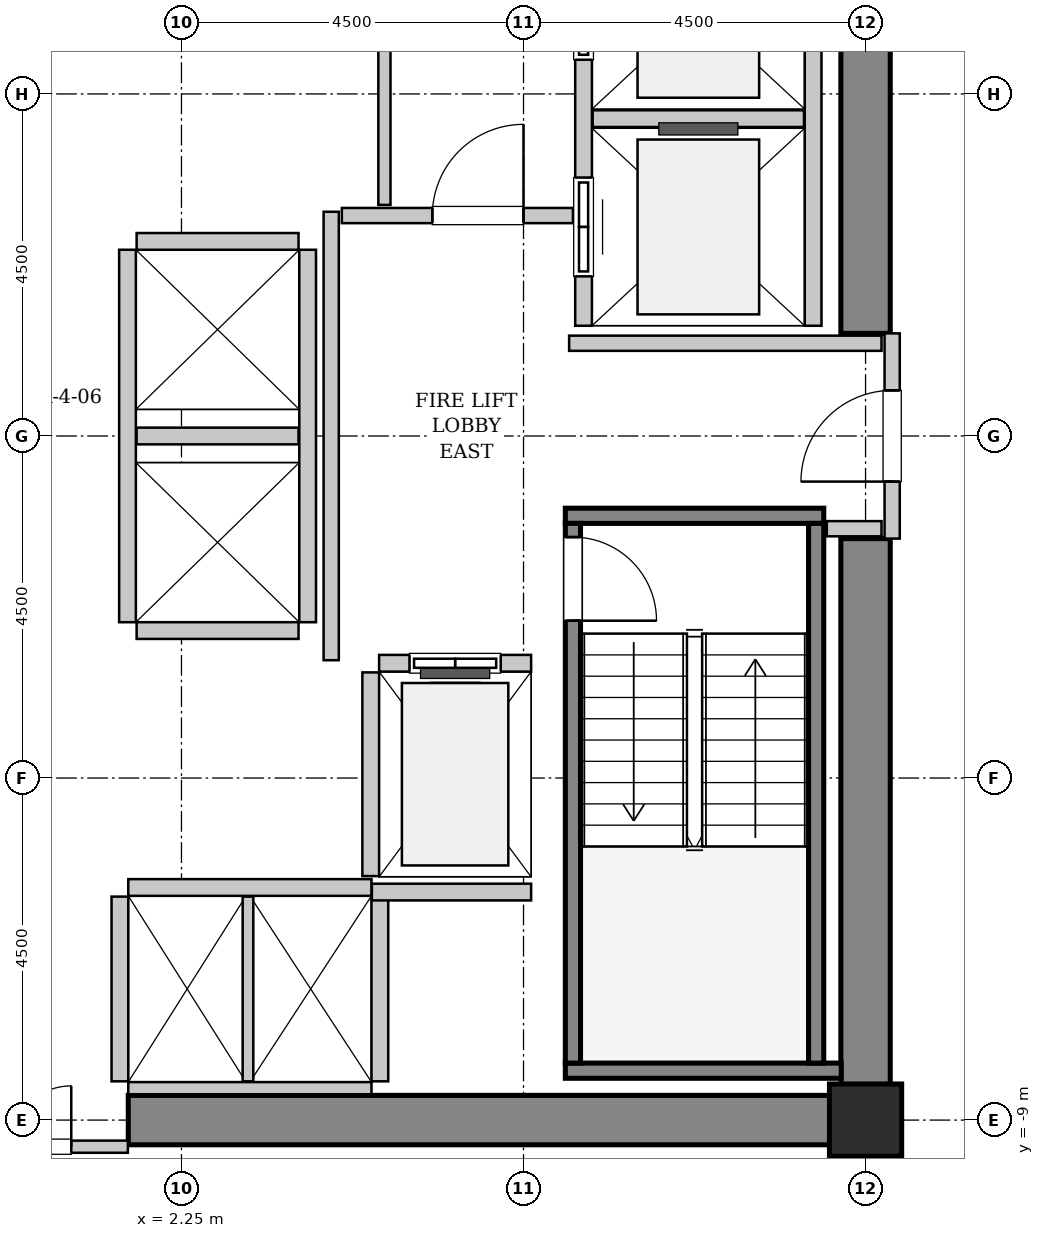
"""IFC4 building model, lengths in metres.
Left out: names, types, materials, properties, quantities, classifications, styles, units other than length and angle.
Written with IfcOpenShell. Run it as: python <this file> out.ifc"""

import sys

from ifc_helpers import new_model, si_unit, direction, frame, frame_2d, origin, origin_2d, place, context, subcontext, project, spatial, rectangle, hollow_rectangle, extrude, source, transform, mapped, element, fill, save


model = new_model("IFC4")
c1 = context("Model", 3, precision=1e-05, world=origin(), true_north=direction((0.0, 1.0)))
c2 = subcontext(c1, "Body", "Model", "MODEL_VIEW")
j1 = project(units=[si_unit("LENGTHUNIT", "METRE"), si_unit("PLANEANGLEUNIT", "RADIAN")], contexts=[c1])
p1 = place(None, origin())
s1 = spatial("IfcSite", under=j1, at=p1, CompositionType="ELEMENT")
p2 = place(p1, origin())
s2 = spatial("IfcBuilding", under=s1, at=p2, CompositionType="ELEMENT")
p3 = place(p2, frame((0.0, 0.0, 36.8)))
s3 = spatial("IfcBuildingStorey", under=s2, at=p3, CompositionType="ELEMENT", Elevation=36.8)
m1 = source(origin(), c2, "Body", "SweptSolid", [
    extrude(rectangle(XDim=10.025, YDim=0.65, at=frame_2d((5.012, 0.0))), origin(), (0.0, 0.0, 1.0), 3.8),
])
p4 = place(p3, frame((1.55, -9.0, 0.0), z_axis=(0.0, 0.0, 1.0), x_axis=(1.0, 0.0, 0.0)))
e1 = element("IfcWall", 1, at=p4, inside=s3, PredefinedType="SHEAR", context=c2, shape_type="MappedRepresentation", body=[
    mapped(m1, transform((0.0, 0.0, 0.0), x_axis=(1.0, 0.0, 0.0), y_axis=(0.0, 1.0, 0.0), z_axis=(0.0, 0.0, 1.0), scale=1.0)),
])
m2 = source(origin(), c2, "Body", "SweptSolid", [
    extrude(rectangle(XDim=7.325, YDim=0.65, at=frame_2d((3.663, 0.0))), origin(), (0.0, 0.0, 1.0), 3.8),
])
for number, where, z_axis, x_axis in (
    (2, (11.25, -8.675, 0.0), (0.0, 0.0, 1.0), (0.0, 1.0, 0.0)),
    (3, (11.25, 1.35, 0.0), (0.0, 0.0, 1.0), (0.0, 1.0, 0.0)),
):
    element("IfcWall", number, at=place(p3, frame(where, z_axis=z_axis, x_axis=x_axis)), inside=s3, PredefinedType="SHEAR", context=c2, shape_type="MappedRepresentation", body=[
        mapped(m2, transform((0.0, 0.0, 0.0), x_axis=(1.0, 0.0, 0.0), y_axis=(0.0, 1.0, 0.0), z_axis=(0.0, 0.0, 1.0), scale=1.0)),
    ])
m3 = source(origin(), c2, "Body", "SweptSolid", [
    extrude(hollow_rectangle(XDim=0.95, YDim=0.95, WallThickness=0.045, InnerFilletRadius=0.045, OuterFilletRadius=0.09, at=origin_2d()), origin(), (0.0, 0.0, 1.0), 3.8),
])
p5 = place(p3, frame((11.25, -9.0, 0.0), z_axis=(0.0, 0.0, 1.0), x_axis=(1.0, 0.0, 0.0)))
e4 = element("IfcColumn", 4, at=p5, inside=s3, PredefinedType="COLUMN", context=c2, shape_type="MappedRepresentation", body=[
    mapped(m3, transform((0.0, 0.0, 0.0), x_axis=(1.0, 0.0, 0.0), y_axis=(0.0, 1.0, 0.0), z_axis=(0.0, 0.0, 1.0), scale=1.0)),
])
m4 = source(origin(), c2, "Body", "SweptSolid", [
    extrude(rectangle(XDim=3.4, YDim=0.2, at=frame_2d((1.7, 0.0))), origin(), (0.0, 0.0, 1.0), 3.8),
])
p6 = place(p3, frame((7.3, -1.05, 0.0), z_axis=(0.0, 0.0, 1.0), x_axis=(1.0, 0.0, 0.0)))
e5 = element("IfcWall", 5, at=p6, inside=s3, PredefinedType="SOLIDWALL", context=c2, shape_type="MappedRepresentation", body=[
    mapped(m4, transform((0.0, 0.0, 0.0), x_axis=(1.0, 0.0, 0.0), y_axis=(0.0, 1.0, 0.0), z_axis=(0.0, 0.0, 1.0), scale=1.0)),
])
m5 = source(origin(), c2, "Body", "SweptSolid", [
    extrude(rectangle(XDim=3.63, YDim=0.2, at=frame_2d((1.815, 0.0))), origin(), (0.0, 0.0, 1.0), 3.8),
])
p7 = place(p3, frame((7.3, -8.35, 0.0), z_axis=(0.0, 0.0, 1.0), x_axis=(1.0, 0.0, 0.0)))
e6 = element("IfcWall", 6, at=p7, inside=s3, PredefinedType="SOLIDWALL", context=c2, shape_type="MappedRepresentation", body=[
    mapped(m5, transform((0.0, 0.0, 0.0), x_axis=(1.0, 0.0, 0.0), y_axis=(0.0, 1.0, 0.0), z_axis=(0.0, 0.0, 1.0), scale=1.0)),
])
m6 = source(origin(), c2, "Body", "SweptSolid", [
    extrude(rectangle(XDim=7.1, YDim=0.2, at=frame_2d((3.55, 0.0))), origin(), (0.0, 0.0, 1.0), 3.8),
])
p8 = place(p3, frame((7.4, -1.15, 0.0), z_axis=(0.0, 0.0, 1.0), x_axis=(0.0, -1.0, 0.0)))
e7 = element("IfcWall", 7, at=p8, inside=s3, PredefinedType="SOLIDWALL", context=c2, shape_type="MappedRepresentation", body=[
    mapped(m6, transform((0.0, 0.0, 0.0), x_axis=(1.0, 0.0, 0.0), y_axis=(0.0, 1.0, 0.0), z_axis=(0.0, 0.0, 1.0), scale=1.0)),
])
p9 = place(p8, frame((0.18, 0.0, 0.0)))
e8 = element("IfcOpeningElement", 8, at=p9, cuts=e7, PredefinedType="OPENING", context=c2, shape_type="SweptSolid", body=[
    extrude(rectangle(XDim=1.1, YDim=2.15, at=frame_2d((0.55, 1.075))), frame((0.0, 0.11, 0.0), z_axis=(0.0, -1.0, 0.0), x_axis=(1.0, 0.0, 0.0)), (0.0, 0.0, 1.0), 0.22),
])
p10 = place(p3, frame((10.6, -1.15, 0.0), z_axis=(0.0, 0.0, 1.0), x_axis=(0.0, -1.0, 0.0)))
e9 = element("IfcWall", 9, at=p10, inside=s3, PredefinedType="SOLIDWALL", context=c2, shape_type="MappedRepresentation", body=[
    mapped(m6, transform((0.0, 0.0, 0.0), x_axis=(1.0, 0.0, 0.0), y_axis=(0.0, 1.0, 0.0), z_axis=(0.0, 0.0, 1.0), scale=1.0)),
])
m7 = source(origin(), c2, "Body", "SweptSolid", [
    extrude(rectangle(XDim=2.0, YDim=0.22, at=frame_2d((1.0, 0.0))), origin(), (0.0, 0.0, 1.0), 3.535),
])
p11 = place(p3, frame((6.85, -2.99, 0.0), z_axis=(0.0, 0.0, 1.0), x_axis=(-1.0, 0.0, 0.0)))
e10 = element("IfcWall", 10, at=p11, inside=s3, PredefinedType="SOLIDWALL", context=c2, shape_type="MappedRepresentation", body=[
    mapped(m7, transform((0.0, 0.0, 0.0), x_axis=(1.0, 0.0, 0.0), y_axis=(0.0, 1.0, 0.0), z_axis=(0.0, 0.0, 1.0), scale=1.0)),
])
p12 = place(p11, frame((0.4, 0.0, 0.0)))
e11 = element("IfcOpeningElement", 11, at=p12, cuts=e10, PredefinedType="OPENING", context=c2, shape_type="SweptSolid", body=[
    extrude(rectangle(XDim=1.2, YDim=2.2, at=frame_2d((0.6, 1.1))), frame((0.0, 0.12, 0.0), z_axis=(0.0, -1.0, 0.0), x_axis=(1.0, 0.0, 0.0)), (0.0, 0.0, 1.0), 0.24),
])
m8 = source(origin(), c2, "Body", "SweptSolid", [
    extrude(rectangle(XDim=2.68, YDim=0.22, at=frame_2d((1.34, 0.0))), origin(), (0.0, 0.0, 1.0), 3.535),
])
p13 = place(p3, frame((4.74, -3.11, 0.0), z_axis=(0.0, 0.0, 1.0), x_axis=(0.0, -1.0, 0.0)))
e12 = element("IfcWall", 12, at=p13, inside=s3, PredefinedType="SOLIDWALL", context=c2, shape_type="MappedRepresentation", body=[
    mapped(m8, transform((0.0, 0.0, 0.0), x_axis=(1.0, 0.0, 0.0), y_axis=(0.0, 1.0, 0.0), z_axis=(0.0, 0.0, 1.0), scale=1.0)),
])
m9 = source(origin(), c2, "Body", "SweptSolid", [
    extrude(rectangle(XDim=5.45, YDim=0.22, at=frame_2d((2.725, 0.0))), origin(), (0.0, 0.0, 1.0), 3.535),
])
p14 = place(p3, frame((7.54, 6.9, 0.0), z_axis=(0.0, 0.0, 1.0), x_axis=(0.0, -1.0, 0.0)))
e13 = element("IfcWall", 13, at=p14, inside=s3, PredefinedType="SOLIDWALL", context=c2, shape_type="MappedRepresentation", body=[
    mapped(m9, transform((0.0, 0.0, 0.0), x_axis=(1.0, 0.0, 0.0), y_axis=(0.0, 1.0, 0.0), z_axis=(0.0, 0.0, 1.0), scale=1.0)),
])
p15 = place(p14, frame((3.5, 0.0, 0.0)))
e14 = element("IfcOpeningElement", 14, at=p15, cuts=e13, PredefinedType="OPENING", context=c2, shape_type="SweptSolid", body=[
    extrude(rectangle(XDim=1.3, YDim=2.3, at=frame_2d((0.65, 1.15))), frame((0.0, 0.12, 0.0), z_axis=(0.0, -1.0, 0.0), x_axis=(1.0, 0.0, 0.0)), (0.0, 0.0, 1.0), 0.24),
])
p16 = place(p14, frame((0.65, 0.0, 0.0)))
e15 = element("IfcOpeningElement", 15, at=p16, cuts=e13, PredefinedType="OPENING", context=c2, shape_type="SweptSolid", body=[
    extrude(rectangle(XDim=1.3, YDim=2.3, at=frame_2d((0.65, 1.15))), frame((0.0, 0.12, 0.0), z_axis=(0.0, -1.0, 0.0), x_axis=(1.0, 0.0, 0.0)), (0.0, 0.0, 1.0), 0.24),
])
p17 = place(p3, frame((10.56, 1.45, 0.0), z_axis=(0.0, 0.0, 1.0), x_axis=(0.0, 1.0, 0.0)))
e16 = element("IfcWall", 16, at=p17, inside=s3, PredefinedType="SOLIDWALL", context=c2, shape_type="MappedRepresentation", body=[
    mapped(m9, transform((0.0, 0.0, 0.0), x_axis=(1.0, 0.0, 0.0), y_axis=(0.0, 1.0, 0.0), z_axis=(0.0, 0.0, 1.0), scale=1.0)),
])
m10 = source(origin(), c2, "Body", "SweptSolid", [
    extrude(rectangle(XDim=2.78, YDim=0.22, at=frame_2d((1.39, 0.0))), origin(), (0.0, 0.0, 1.0), 3.535),
])
p18 = place(p3, frame((7.66, 4.175, 0.0), z_axis=(0.0, 0.0, 1.0), x_axis=(1.0, 0.0, 0.0)))
e17 = element("IfcWall", 17, at=p18, inside=s3, PredefinedType="SOLIDWALL", context=c2, shape_type="MappedRepresentation", body=[
    mapped(m10, transform((0.0, 0.0, 0.0), x_axis=(1.0, 0.0, 0.0), y_axis=(0.0, 1.0, 0.0), z_axis=(0.0, 0.0, 1.0), scale=1.0)),
])
m11 = source(origin(), c2, "Body", "SweptSolid", [
    extrude(rectangle(XDim=3.2, YDim=0.22, at=frame_2d((1.6, 0.0))), origin(), (0.0, 0.0, 1.0), 3.535),
])
p19 = place(p3, frame((4.75, -5.94, 0.0), z_axis=(0.0, 0.0, 1.0), x_axis=(-1.0, 0.0, 0.0)))
e18 = element("IfcWall", 18, at=p19, inside=s3, PredefinedType="SOLIDWALL", context=c2, shape_type="MappedRepresentation", body=[
    mapped(m11, transform((0.0, 0.0, 0.0), x_axis=(1.0, 0.0, 0.0), y_axis=(0.0, 1.0, 0.0), z_axis=(0.0, 0.0, 1.0), scale=1.0)),
])
m12 = source(origin(), c2, "Body", "SweptSolid", [
    extrude(rectangle(XDim=3.2, YDim=0.16, at=frame_2d((1.6, 0.0))), origin(), (0.0, 0.0, 1.0), 2.425),
])
p20 = place(p3, frame((1.55, -8.58, 0.0), z_axis=(0.0, 0.0, 1.0), x_axis=(1.0, 0.0, 0.0)))
e19 = element("IfcWall", 19, at=p20, inside=s3, PredefinedType="PARTITIONING", context=c2, shape_type="MappedRepresentation", body=[
    mapped(m12, transform((0.0, 0.0, 0.0), x_axis=(1.0, 0.0, 0.0), y_axis=(0.0, 1.0, 0.0), z_axis=(0.0, 0.0, 1.0), scale=1.0)),
])
m13 = source(origin(), c2, "Body", "SweptSolid", [
    extrude(rectangle(XDim=2.43, YDim=0.22, at=frame_2d((1.215, 0.0))), origin(), (0.0, 0.0, 1.0), 3.535),
])
p21 = place(p3, frame((1.44, -6.06, 0.0), z_axis=(0.0, 0.0, 1.0), x_axis=(0.0, -1.0, 0.0)))
e20 = element("IfcWall", 20, at=p21, inside=s3, PredefinedType="SOLIDWALL", context=c2, shape_type="MappedRepresentation", body=[
    mapped(m13, transform((0.0, 0.0, 0.0), x_axis=(1.0, 0.0, 0.0), y_axis=(0.0, 1.0, 0.0), z_axis=(0.0, 0.0, 1.0), scale=1.0)),
])
m14 = source(origin(), c2, "Body", "SweptSolid", [
    extrude(rectangle(XDim=2.43, YDim=0.14, at=frame_2d((1.215, 0.0))), origin(), (0.0, 0.0, 1.0), 3.535),
])
p22 = place(p3, frame((3.125, -8.49, 0.0), z_axis=(0.0, 0.0, 1.0), x_axis=(0.0, 1.0, 0.0)))
e21 = element("IfcWall", 21, at=p22, inside=s3, PredefinedType="PARTITIONING", context=c2, shape_type="MappedRepresentation", body=[
    mapped(m14, transform((0.0, 0.0, 0.0), x_axis=(1.0, 0.0, 0.0), y_axis=(0.0, 1.0, 0.0), z_axis=(0.0, 0.0, 1.0), scale=1.0)),
])
p23 = place(p3, frame((4.86, -8.49, 0.0), z_axis=(0.0, 0.0, 1.0), x_axis=(0.0, 1.0, 0.0)))
e22 = element("IfcWall", 22, at=p23, inside=s3, PredefinedType="SOLIDWALL", context=c2, shape_type="MappedRepresentation", body=[
    mapped(m13, transform((0.0, 0.0, 0.0), x_axis=(1.0, 0.0, 0.0), y_axis=(0.0, 1.0, 0.0), z_axis=(0.0, 0.0, 1.0), scale=1.0)),
])
m15 = source(origin(), c2, "Body", "SweptSolid", [
    extrude(rectangle(XDim=4.9, YDim=0.22, at=frame_2d((2.45, 0.0))), origin(), (0.0, 0.0, 1.0), 3.535),
])
for number, where, z_axis, x_axis in (
    (23, (1.54, 2.45, 0.0), (0.0, 0.0, 1.0), (0.0, -1.0, 0.0)),
    (24, (3.91, -2.45, 0.0), (0.0, 0.0, 1.0), (0.0, 1.0, 0.0)),
):
    element("IfcWall", number, at=place(p3, frame(where, z_axis=z_axis, x_axis=x_axis)), inside=s3, PredefinedType="SOLIDWALL", context=c2, shape_type="MappedRepresentation", body=[
        mapped(m15, transform((0.0, 0.0, 0.0), x_axis=(1.0, 0.0, 0.0), y_axis=(0.0, 1.0, 0.0), z_axis=(0.0, 0.0, 1.0), scale=1.0)),
    ])
m16 = source(origin(), c2, "Body", "SweptSolid", [
    extrude(rectangle(XDim=2.13, YDim=0.22, at=frame_2d((1.065, 0.0))), origin(), (0.0, 0.0, 1.0), 3.535),
])
for number, where, z_axis, x_axis in (
    (25, (1.66, -2.56, 0.0), (0.0, 0.0, 1.0), (1.0, 0.0, 0.0)),
    (26, (1.66, 0.0, 0.0), (0.0, 0.0, 1.0), (1.0, 0.0, 0.0)),
    (27, (3.79, 2.56, 0.0), (0.0, 0.0, 1.0), (-1.0, 0.0, 0.0)),
):
    element("IfcWall", number, at=place(p3, frame(where, z_axis=z_axis, x_axis=x_axis)), inside=s3, PredefinedType="SOLIDWALL", context=c2, shape_type="MappedRepresentation", body=[
        mapped(m16, transform((0.0, 0.0, 0.0), x_axis=(1.0, 0.0, 0.0), y_axis=(0.0, 1.0, 0.0), z_axis=(0.0, 0.0, 1.0), scale=1.0)),
    ])
m17 = source(origin(), c2, "Body", "SweptSolid", [
    extrude(rectangle(XDim=2.095, YDim=0.22, at=frame_2d((1.048, 0.0))), origin(), (0.0, 0.0, 1.0), 3.535),
])
p24 = place(p3, frame((4.755, -6.0, 0.0), z_axis=(0.0, 0.0, 1.0), x_axis=(1.0, 0.0, 0.0)))
e28 = element("IfcWall", 28, at=p24, inside=s3, PredefinedType="SOLIDWALL", context=c2, shape_type="MappedRepresentation", body=[
    mapped(m17, transform((0.0, 0.0, 0.0), x_axis=(1.0, 0.0, 0.0), y_axis=(0.0, 1.0, 0.0), z_axis=(0.0, 0.0, 1.0), scale=1.0)),
])
m18 = source(origin(), c2, "Body", "SweptSolid", [
    extrude(rectangle(XDim=2.7, YDim=0.2, at=frame_2d((1.35, 0.0))), origin(), (0.0, 0.0, 1.0), 2.425),
])
p25 = place(p3, frame((11.6, -1.35, 0.0), z_axis=(0.0, 0.0, 1.0), x_axis=(0.0, 1.0, 0.0)))
e29 = element("IfcWall", 29, at=p25, inside=s3, PredefinedType="PARTITIONING", context=c2, shape_type="MappedRepresentation", body=[
    mapped(m18, transform((0.0, 0.0, 0.0), x_axis=(1.0, 0.0, 0.0), y_axis=(0.0, 1.0, 0.0), z_axis=(0.0, 0.0, 1.0), scale=1.0)),
])
p26 = place(p25, frame((0.75, 0.0, 0.0)))
e30 = element("IfcOpeningElement", 30, at=p26, cuts=e29, PredefinedType="OPENING", context=c2, shape_type="SweptSolid", body=[
    extrude(rectangle(XDim=1.2, YDim=2.15, at=frame_2d((0.6, 1.075))), frame((0.0, 0.11, 0.0), z_axis=(0.0, -1.0, 0.0), x_axis=(1.0, 0.0, 0.0)), (0.0, 0.0, 1.0), 0.22),
])
m19 = source(origin(), c2, "Body", "SweptSolid", [
    extrude(rectangle(XDim=5.9, YDim=0.2, at=frame_2d((2.95, 0.0))), origin(), (0.0, 0.0, 1.0), 3.535),
])
p27 = place(p3, frame((4.22, -2.95, 0.0), z_axis=(0.0, 0.0, 1.0), x_axis=(0.0, 1.0, 0.0)))
e31 = element("IfcWall", 31, at=p27, inside=s3, PredefinedType="PARTITIONING", context=c2, shape_type="MappedRepresentation", body=[
    mapped(m19, transform((0.0, 0.0, 0.0), x_axis=(1.0, 0.0, 0.0), y_axis=(0.0, 1.0, 0.0), z_axis=(0.0, 0.0, 1.0), scale=1.0)),
])
m20 = source(origin(), c2, "Body", "SweptSolid", [
    extrude(rectangle(XDim=3.04, YDim=0.2, at=frame_2d((1.52, 0.0))), origin(), (0.0, 0.0, 1.0), 3.535),
])
p28 = place(p3, frame((4.36, 2.9, 0.0), z_axis=(0.0, 0.0, 1.0), x_axis=(1.0, 0.0, 0.0)))
e32 = element("IfcWall", 32, at=p28, inside=s3, PredefinedType="PARTITIONING", context=c2, shape_type="MappedRepresentation", body=[
    mapped(m20, transform((0.0, 0.0, 0.0), x_axis=(1.0, 0.0, 0.0), y_axis=(0.0, 1.0, 0.0), z_axis=(0.0, 0.0, 1.0), scale=1.0)),
])
p29 = place(p28, frame((1.19, 0.0, 0.0)))
e33 = element("IfcOpeningElement", 33, at=p29, cuts=e32, PredefinedType="OPENING", context=c2, shape_type="SweptSolid", body=[
    extrude(rectangle(XDim=1.2, YDim=2.15, at=frame_2d((0.6, 1.075))), frame((0.0, 0.11, 0.0), z_axis=(0.0, -1.0, 0.0), x_axis=(1.0, 0.0, 0.0)), (0.0, 0.0, 1.0), 0.22),
])
m21 = source(origin(), c2, "Body", "SweptSolid", [
    extrude(rectangle(XDim=4.11, YDim=0.2, at=frame_2d((2.055, 0.0))), origin(), (0.0, 0.0, 1.0), 3.535),
])
p30 = place(p3, frame((7.35, 1.22, 0.0), z_axis=(0.0, 0.0, 1.0), x_axis=(1.0, 0.0, 0.0)))
e34 = element("IfcWall", 34, at=p30, inside=s3, PredefinedType="PARTITIONING", context=c2, shape_type="MappedRepresentation", body=[
    mapped(m21, transform((0.0, 0.0, 0.0), x_axis=(1.0, 0.0, 0.0), y_axis=(0.0, 1.0, 0.0), z_axis=(0.0, 0.0, 1.0), scale=1.0)),
])
m22 = source(origin(), c2, "Body", "SweptSolid", [
    extrude(rectangle(XDim=0.72, YDim=0.2, at=frame_2d((0.36, 0.0))), origin(), (0.0, 0.0, 1.0), 3.535),
])
p31 = place(p3, frame((10.74, -1.22, 0.0), z_axis=(0.0, 0.0, 1.0), x_axis=(1.0, 0.0, 0.0)))
e35 = element("IfcWall", 35, at=p31, inside=s3, PredefinedType="PARTITIONING", context=c2, shape_type="MappedRepresentation", body=[
    mapped(m22, transform((0.0, 0.0, 0.0), x_axis=(1.0, 0.0, 0.0), y_axis=(0.0, 1.0, 0.0), z_axis=(0.0, 0.0, 1.0), scale=1.0)),
])
m23 = source(origin(), c2, "Body", "SweptSolid", [
    extrude(rectangle(XDim=3.09, YDim=0.16, at=frame_2d((1.545, 0.0))), origin(), (0.0, 0.0, 1.0), 2.425),
])
p32 = place(p3, frame((-1.545, -9.35, 0.0), z_axis=(0.0, 0.0, 1.0), x_axis=(1.0, 0.0, 0.0)))
e36 = element("IfcWall", 36, at=p32, inside=s3, PredefinedType="PARTITIONING", context=c2, shape_type="MappedRepresentation", body=[
    mapped(m23, transform((0.0, 0.0, 0.0), x_axis=(1.0, 0.0, 0.0), y_axis=(0.0, 1.0, 0.0), z_axis=(0.0, 0.0, 1.0), scale=1.0)),
])
p33 = place(p32, frame((0.745, 0.0, 0.0)))
e37 = element("IfcOpeningElement", 37, at=p33, cuts=e36, PredefinedType="OPENING", context=c2, shape_type="SweptSolid", body=[
    extrude(rectangle(XDim=1.6, YDim=2.3, at=frame_2d((0.8, 1.15))), frame((0.0, 0.09, 0.0), z_axis=(0.0, -1.0, 0.0), x_axis=(1.0, 0.0, 0.0)), (0.0, 0.0, 1.0), 0.18),
])
m24 = source(origin(), c2, "Body", "SweptSolid", [
    extrude(rectangle(XDim=3.015, YDim=0.16, at=frame_2d((1.507, 0.0))), origin(), (0.0, 0.0, 1.0), 3.535),
])
p34 = place(p3, frame((4.92, 3.04, 0.0), z_axis=(0.0, 0.0, 1.0), x_axis=(0.0, 1.0, 0.0)))
e38 = element("IfcWall", 38, at=p34, inside=s3, PredefinedType="PARTITIONING", context=c2, shape_type="MappedRepresentation", body=[
    mapped(m24, transform((0.0, 0.0, 0.0), x_axis=(1.0, 0.0, 0.0), y_axis=(0.0, 1.0, 0.0), z_axis=(0.0, 0.0, 1.0), scale=1.0)),
])
m25 = source(origin(), c2, "Body", "SweptSolid", [
    extrude(rectangle(XDim=1.1, YDim=2.15, at=frame_2d((0.55, 1.075))), frame((0.0, 0.025, 0.0), z_axis=(0.0, -1.0, 0.0), x_axis=(1.0, 0.0, 0.0)), (0.0, 0.0, 1.0), 0.05),
])
p35 = place(p9, origin())
e39 = element("IfcDoor", 39, at=p35, inside=s3, OperationType="SINGLE_SWING_RIGHT", PredefinedType="DOOR", context=c2, shape_type="MappedRepresentation", body=[
    mapped(m25, transform((0.0, 0.0, 0.0), x_axis=(1.0, 0.0, 0.0), y_axis=(0.0, 1.0, 0.0), z_axis=(0.0, 0.0, 1.0), scale=1.0)),
])
fill(e8, e39)
m26 = source(origin(), c2, "Body", "SweptSolid", [
    extrude(rectangle(XDim=1.2, YDim=2.2, at=frame_2d((0.6, 1.1))), frame((0.0, 0.025, 0.0), z_axis=(0.0, -1.0, 0.0), x_axis=(1.0, 0.0, 0.0)), (0.0, 0.0, 1.0), 0.05),
])
p36 = place(p12, origin())
e40 = element("IfcDoor", 40, at=p36, inside=s3, OperationType="SLIDING_TO_LEFT", PredefinedType="DOOR", context=c2, shape_type="MappedRepresentation", body=[
    mapped(m26, transform((0.0, 0.0, 0.0), x_axis=(1.0, 0.0, 0.0), y_axis=(0.0, 1.0, 0.0), z_axis=(0.0, 0.0, 1.0), scale=1.0)),
])
fill(e11, e40)
m27 = source(origin(), c2, "Body", "SweptSolid", [
    extrude(rectangle(XDim=1.3, YDim=2.3, at=frame_2d((0.65, 1.15))), frame((0.0, 0.025, 0.0), z_axis=(0.0, -1.0, 0.0), x_axis=(1.0, 0.0, 0.0)), (0.0, 0.0, 1.0), 0.05),
])
p37 = place(p15, origin())
e41 = element("IfcDoor", 41, at=p37, inside=s3, OperationType="SLIDING_TO_RIGHT", PredefinedType="DOOR", context=c2, shape_type="MappedRepresentation", body=[
    mapped(m27, transform((0.0, 0.0, 0.0), x_axis=(1.0, 0.0, 0.0), y_axis=(0.0, 1.0, 0.0), z_axis=(0.0, 0.0, 1.0), scale=1.0)),
])
fill(e14, e41)
p38 = place(p16, origin())
e42 = element("IfcDoor", 42, at=p38, inside=s3, OperationType="SLIDING_TO_RIGHT", PredefinedType="DOOR", context=c2, shape_type="MappedRepresentation", body=[
    mapped(m27, transform((0.0, 0.0, 0.0), x_axis=(1.0, 0.0, 0.0), y_axis=(0.0, 1.0, 0.0), z_axis=(0.0, 0.0, 1.0), scale=1.0)),
])
fill(e15, e42)
m28 = source(origin(), c2, "Body", "SweptSolid", [
    extrude(rectangle(XDim=1.2, YDim=2.15, at=frame_2d((0.6, 1.075))), frame((0.0, 0.025, 0.0), z_axis=(0.0, -1.0, 0.0), x_axis=(1.0, 0.0, 0.0)), (0.0, 0.0, 1.0), 0.05),
])
p39 = place(p26, origin())
e43 = element("IfcDoor", 43, at=p39, inside=s3, OperationType="SINGLE_SWING_LEFT", PredefinedType="DOOR", context=c2, shape_type="MappedRepresentation", body=[
    mapped(m28, transform((0.0, 0.0, 0.0), x_axis=(1.0, 0.0, 0.0), y_axis=(0.0, 1.0, 0.0), z_axis=(0.0, 0.0, 1.0), scale=1.0)),
])
fill(e30, e43)
p40 = place(p29, origin())
e44 = element("IfcDoor", 44, at=p40, inside=s3, OperationType="SINGLE_SWING_RIGHT", PredefinedType="DOOR", context=c2, shape_type="MappedRepresentation", body=[
    mapped(m28, transform((0.0, 0.0, 0.0), x_axis=(1.0, 0.0, 0.0), y_axis=(0.0, 1.0, 0.0), z_axis=(0.0, 0.0, 1.0), scale=1.0)),
])
fill(e33, e44)
m29 = source(origin(), c2, "Body", "SweptSolid", [
    extrude(rectangle(XDim=1.6, YDim=2.3, at=frame_2d((0.8, 1.15))), frame((0.0, 0.025, 0.0), z_axis=(0.0, -1.0, 0.0), x_axis=(1.0, 0.0, 0.0)), (0.0, 0.0, 1.0), 0.05),
])
p41 = place(p33, origin())
e45 = element("IfcDoor", 45, at=p41, inside=s3, OperationType="DOUBLE_DOOR_SINGLE_SWING", PredefinedType="DOOR", context=c2, shape_type="MappedRepresentation", body=[
    mapped(m29, transform((0.0, 0.0, 0.0), x_axis=(1.0, 0.0, 0.0), y_axis=(0.0, 1.0, 0.0), z_axis=(0.0, 0.0, 1.0), scale=1.0)),
])
fill(e37, e45)
save(model, sys.argv[1])
